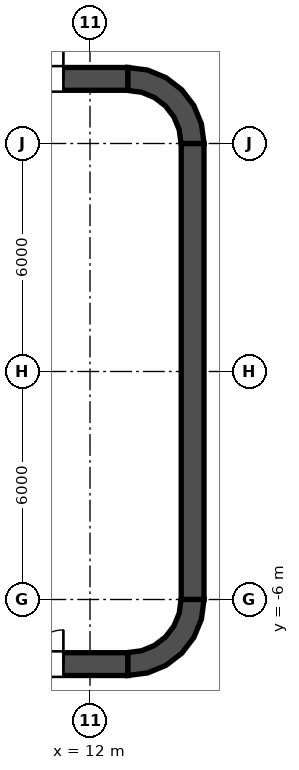
"""IFC4 building model, lengths in metres.
Left out: names, types, materials, properties, quantities, classifications, styles, units other than length and angle.
Written with IfcOpenShell. Run it as: python <this file> out.ifc"""

import sys

from ifc_helpers import new_model, si_unit, direction, frame, frame_2d, origin, place, context, subcontext, project, spatial, polyline, rectangle, outline, extrude, element, fill, save


model = new_model("IFC4")
c1 = context("Model", 3, precision=1e-05, world=origin(), true_north=direction((0.0, 1.0)))
c2 = subcontext(c1, "Body", "Model", "MODEL_VIEW")
j1 = project(units=[si_unit("LENGTHUNIT", "METRE"), si_unit("PLANEANGLEUNIT", "RADIAN")], contexts=[c1])
p1 = place(None, origin())
s1 = spatial("IfcSite", under=j1, at=p1, CompositionType="ELEMENT")
p2 = place(p1, origin())
s2 = spatial("IfcBuilding", under=s1, at=p2, CompositionType="ELEMENT")
p3 = place(p2, frame((0.0, 0.0, 135.6)))
s3 = spatial("IfcBuildingStorey", under=s2, at=p3, CompositionType="ELEMENT", Elevation=135.6)
p4 = place(p3, frame((-13.0, 7.7, 0.0), z_axis=(0.0, 0.0, 1.0), x_axis=(1.0, 0.0, 0.0)))
e1 = element("IfcWall", 1, at=p4, inside=s3, PredefinedType="SHEAR", context=c2, shape_type="SweptSolid", body=[
    extrude(rectangle(XDim=26.0, YDim=0.6, at=frame_2d((13.0, 0.0))), origin(), (0.0, 0.0, 1.0), 4.2),
])
p5 = place(p4, frame((1.7, 0.0, 0.0)))
e2 = element("IfcOpeningElement", 2, at=p5, cuts=e1, PredefinedType="OPENING", context=c2, shape_type="SweptSolid", body=[
    extrude(rectangle(XDim=1.8, YDim=2.1, at=frame_2d((0.9, 1.05))), frame((0.0, 0.3, 0.0), z_axis=(0.0, -1.0, 0.0), x_axis=(1.0, 0.0, 0.0)), (0.0, 0.0, 1.0), 0.6),
])
p6 = place(p4, frame((22.5, 0.0, 0.0)))
e3 = element("IfcOpeningElement", 3, at=p6, cuts=e1, PredefinedType="OPENING", context=c2, shape_type="SweptSolid", body=[
    extrude(rectangle(XDim=1.8, YDim=2.1, at=frame_2d((0.9, 1.05))), frame((0.0, 0.3, 0.0), z_axis=(0.0, -1.0, 0.0), x_axis=(1.0, 0.0, 0.0)), (0.0, 0.0, 1.0), 0.6),
])
p7 = place(p3, frame((-13.0, -7.7, 0.0), z_axis=(0.0, 0.0, 1.0), x_axis=(1.0, 0.0, 0.0)))
e4 = element("IfcWall", 4, at=p7, inside=s3, PredefinedType="SHEAR", context=c2, shape_type="SweptSolid", body=[
    extrude(rectangle(XDim=26.0, YDim=0.6, at=frame_2d((13.0, 0.0))), origin(), (0.0, 0.0, 1.0), 4.2),
])
p8 = place(p7, frame((1.7, 0.0, 0.0)))
e5 = element("IfcOpeningElement", 5, at=p8, cuts=e4, PredefinedType="OPENING", context=c2, shape_type="SweptSolid", body=[
    extrude(rectangle(XDim=1.8, YDim=2.1, at=frame_2d((0.9, 1.05))), frame((0.0, 0.3, 0.0), z_axis=(0.0, -1.0, 0.0), x_axis=(1.0, 0.0, 0.0)), (0.0, 0.0, 1.0), 0.6),
])
p9 = place(p7, frame((22.5, 0.0, 0.0)))
e6 = element("IfcOpeningElement", 6, at=p9, cuts=e4, PredefinedType="OPENING", context=c2, shape_type="SweptSolid", body=[
    extrude(rectangle(XDim=1.8, YDim=2.1, at=frame_2d((0.9, 1.05))), frame((0.0, 0.3, 0.0), z_axis=(0.0, -1.0, 0.0), x_axis=(1.0, 0.0, 0.0)), (0.0, 0.0, 1.0), 0.6),
])
p10 = place(p3, frame((14.7, -6.0, 0.0), z_axis=(0.0, 0.0, 1.0), x_axis=(0.0, 1.0, 0.0)))
e7 = element("IfcWall", 7, at=p10, inside=s3, PredefinedType="SHEAR", context=c2, shape_type="SweptSolid", body=[
    extrude(rectangle(XDim=12.0, YDim=0.6, at=frame_2d((6.0, 0.0))), origin(), (0.0, 0.0, 1.0), 4.2),
])
p11 = place(p3, origin())
e8 = element("IfcWall", 8, at=p11, inside=s3, PredefinedType="SHEAR", context=c2, shape_type="SweptSolid", body=[
    extrude(outline(polyline([(13.0, 8.0), (13.0, 7.395), (13.361, 7.347), (13.698, 7.208), (13.986, 6.986), (14.208, 6.698), (14.347, 6.361), (14.395, 6.0), (15.0, 6.0), (14.932, 6.518), (14.732, 7.0), (14.414, 7.414), (14.0, 7.732), (13.518, 7.932), (13.0, 8.0)])), origin(), (0.0, 0.0, 1.0), 4.2),
])
e9 = element("IfcWall", 9, at=p11, inside=s3, PredefinedType="SHEAR", context=c2, shape_type="SweptSolid", body=[
    extrude(outline(polyline([(15.0, -6.0), (14.395, -6.0), (14.347, -6.361), (14.208, -6.698), (13.986, -6.986), (13.698, -7.208), (13.361, -7.347), (13.0, -7.395), (13.0, -8.0), (13.518, -7.932), (14.0, -7.732), (14.414, -7.414), (14.732, -7.0), (14.932, -6.518), (15.0, -6.0)])), origin(), (0.0, 0.0, 1.0), 4.2),
])
p12 = place(p3, frame((11.8, -7.4, 0.0), z_axis=(0.0, 0.0, 1.0), x_axis=(0.0, 1.0, 0.0)))
e10 = element("IfcWall", 10, at=p12, inside=s3, PredefinedType="SOLIDWALL", context=c2, shape_type="SweptSolid", body=[
    extrude(rectangle(XDim=14.8, YDim=0.4, at=frame_2d((7.4, 0.0))), origin(), (0.0, 0.0, 1.0), 4.05),
])
p13 = place(p12, frame((11.2, 0.0, 0.0)))
e11 = element("IfcOpeningElement", 11, at=p13, cuts=e10, PredefinedType="OPENING", context=c2, shape_type="SweptSolid", body=[
    extrude(rectangle(XDim=1.1, YDim=2.1, at=frame_2d((0.55, 1.05))), frame((0.0, 0.2, 0.0), z_axis=(0.0, -1.0, 0.0), x_axis=(1.0, 0.0, 0.0)), (0.0, 0.0, 1.0), 0.4),
])
p14 = place(p12, frame((8.3, 0.0, 0.0)))
e12 = element("IfcOpeningElement", 12, at=p14, cuts=e10, PredefinedType="OPENING", context=c2, shape_type="SweptSolid", body=[
    extrude(rectangle(XDim=1.1, YDim=2.1, at=frame_2d((0.55, 1.05))), frame((0.0, 0.2, 0.0), z_axis=(0.0, -1.0, 0.0), x_axis=(1.0, 0.0, 0.0)), (0.0, 0.0, 1.0), 0.4),
])
p15 = place(p12, frame((5.4, 0.0, 0.0)))
e13 = element("IfcOpeningElement", 13, at=p15, cuts=e10, PredefinedType="OPENING", context=c2, shape_type="SweptSolid", body=[
    extrude(rectangle(XDim=1.1, YDim=2.1, at=frame_2d((0.55, 1.05))), frame((0.0, 0.2, 0.0), z_axis=(0.0, -1.0, 0.0), x_axis=(1.0, 0.0, 0.0)), (0.0, 0.0, 1.0), 0.4),
])
p16 = place(p12, frame((13.552, 0.0, 0.0)))
e14 = element("IfcOpeningElement", 14, at=p16, cuts=e10, PredefinedType="OPENING", context=c2, shape_type="SweptSolid", body=[
    extrude(rectangle(XDim=0.9, YDim=2.1, at=frame_2d((0.45, 1.05))), frame((0.0, 0.2, 0.0), z_axis=(0.0, -1.0, 0.0), x_axis=(1.0, 0.0, 0.0)), (0.0, 0.0, 1.0), 0.4),
])
p17 = place(p12, frame((0.347, 0.0, 0.0)))
e15 = element("IfcOpeningElement", 15, at=p17, cuts=e10, PredefinedType="OPENING", context=c2, shape_type="SweptSolid", body=[
    extrude(rectangle(XDim=0.9, YDim=2.1, at=frame_2d((0.45, 1.05))), frame((0.0, 0.2, 0.0), z_axis=(0.0, -1.0, 0.0), x_axis=(1.0, 0.0, 0.0)), (0.0, 0.0, 1.0), 0.4),
])
e16 = element("IfcWall", 16, at=p11, inside=s3, PredefinedType="SOLIDWALL", context=c2, shape_type="SweptSolid", body=[
    extrude(outline(polyline([(12.0, -5.675), (12.0, -5.925), (14.15, -5.925), (14.4, -5.925), (14.4, -5.675), (14.4, -3.025), (14.4, -2.775), (14.4, -0.125), (14.4, 0.125), (14.4, 2.775), (14.4, 3.025), (14.4, 5.675), (14.4, 5.925), (14.15, 5.925), (12.0, 5.925), (12.0, 5.675), (14.15, 5.675), (14.15, 3.025), (12.0, 3.025), (12.0, 2.775), (14.15, 2.775), (14.15, 0.125), (12.0, 0.125), (12.0, -0.125), (14.15, -0.125), (14.15, -2.775), (12.0, -2.775), (12.0, -3.025), (14.15, -3.025), (14.15, -5.675), (12.0, -5.675)])), origin(), (0.0, 0.0, 1.0), 4.05),
])
p18 = place(p13, origin())
e17 = element("IfcDoor", 17, at=p18, inside=s3, OperationType="DOUBLE_DOOR_SLIDING", PredefinedType="DOOR", context=c2, shape_type="SweptSolid", body=[
    extrude(rectangle(XDim=1.1, YDim=2.1, at=frame_2d((0.55, 1.05))), frame((0.0, 0.025, 0.0), z_axis=(0.0, -1.0, 0.0), x_axis=(1.0, 0.0, 0.0)), (0.0, 0.0, 1.0), 0.05),
])
fill(e11, e17)
p19 = place(p14, origin())
e18 = element("IfcDoor", 18, at=p19, inside=s3, OperationType="DOUBLE_DOOR_SLIDING", PredefinedType="DOOR", context=c2, shape_type="SweptSolid", body=[
    extrude(rectangle(XDim=1.1, YDim=2.1, at=frame_2d((0.55, 1.05))), frame((0.0, 0.025, 0.0), z_axis=(0.0, -1.0, 0.0), x_axis=(1.0, 0.0, 0.0)), (0.0, 0.0, 1.0), 0.05),
])
fill(e12, e18)
p20 = place(p15, origin())
e19 = element("IfcDoor", 19, at=p20, inside=s3, OperationType="DOUBLE_DOOR_SLIDING", PredefinedType="DOOR", context=c2, shape_type="SweptSolid", body=[
    extrude(rectangle(XDim=1.1, YDim=2.1, at=frame_2d((0.55, 1.05))), frame((0.0, 0.025, 0.0), z_axis=(0.0, -1.0, 0.0), x_axis=(1.0, 0.0, 0.0)), (0.0, 0.0, 1.0), 0.05),
])
fill(e13, e19)
p21 = place(p16, origin())
e20 = element("IfcDoor", 20, at=p21, inside=s3, OperationType="SINGLE_SWING_RIGHT", PredefinedType="DOOR", context=c2, shape_type="SweptSolid", body=[
    extrude(rectangle(XDim=0.9, YDim=2.1, at=frame_2d((0.45, 1.05))), frame((0.0, 0.025, 0.0), z_axis=(0.0, -1.0, 0.0), x_axis=(1.0, 0.0, 0.0)), (0.0, 0.0, 1.0), 0.05),
])
fill(e14, e20)
p22 = place(p17, origin())
e21 = element("IfcDoor", 21, at=p22, inside=s3, OperationType="SINGLE_SWING_RIGHT", PredefinedType="DOOR", context=c2, shape_type="SweptSolid", body=[
    extrude(rectangle(XDim=0.9, YDim=2.1, at=frame_2d((0.45, 1.05))), frame((0.0, 0.025, 0.0), z_axis=(0.0, -1.0, 0.0), x_axis=(1.0, 0.0, 0.0)), (0.0, 0.0, 1.0), 0.05),
])
fill(e15, e21)
p23 = place(p6, origin())
e22 = element("IfcDoor", 22, at=p23, inside=s3, OperationType="DOUBLE_DOOR_SINGLE_SWING", PredefinedType="DOOR", context=c2, shape_type="SweptSolid", body=[
    extrude(rectangle(XDim=1.8, YDim=2.1, at=frame_2d((0.9, 1.05))), frame((0.0, 0.025, 0.0), z_axis=(0.0, -1.0, 0.0), x_axis=(1.0, 0.0, 0.0)), (0.0, 0.0, 1.0), 0.05),
])
fill(e3, e22)
p24 = place(p9, origin())
e23 = element("IfcDoor", 23, at=p24, inside=s3, OperationType="DOUBLE_DOOR_SINGLE_SWING", PredefinedType="DOOR", context=c2, shape_type="SweptSolid", body=[
    extrude(rectangle(XDim=1.8, YDim=2.1, at=frame_2d((0.9, 1.05))), frame((0.0, 0.025, 0.0), z_axis=(0.0, -1.0, 0.0), x_axis=(1.0, 0.0, 0.0)), (0.0, 0.0, 1.0), 0.05),
])
fill(e6, e23)
save(model, sys.argv[1])
